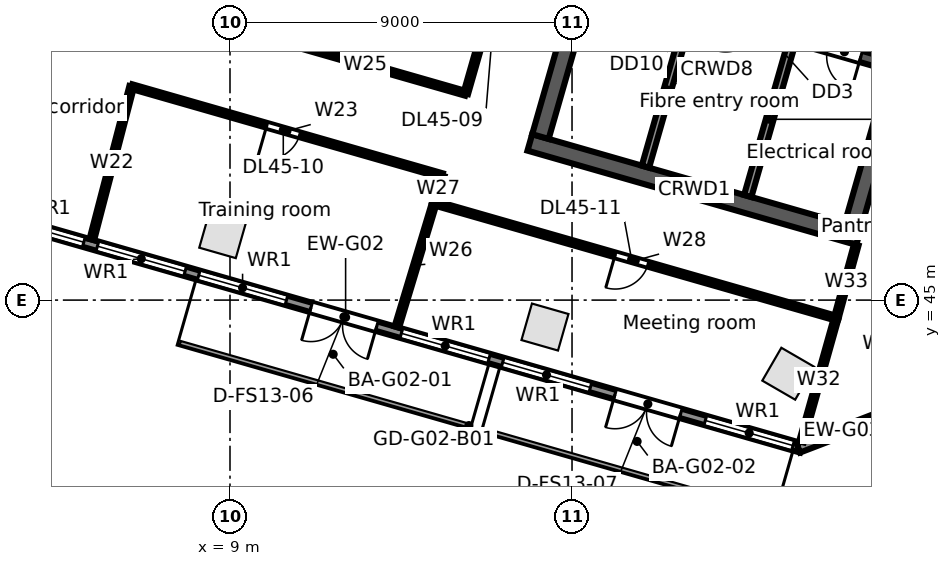
"""IFC4 building model, lengths in metres.
Left out: names, types, materials, properties, quantities, classifications, styles, units other than length and angle.
Written with IfcOpenShell. Run it as: python <this file> out.ifc"""

import sys

from ifc_helpers import new_model, si_unit, direction, frame, frame_2d, origin, origin_2d, place, context, subcontext, project, spatial, rectangle, extrude, element, fill, save


model = new_model("IFC4")
c1 = context("Model", 3, precision=1e-05, world=origin(), true_north=direction((0.0, 1.0)))
c2 = subcontext(c1, "Body", "Model", "MODEL_VIEW")
j1 = project(units=[si_unit("LENGTHUNIT", "METRE"), si_unit("PLANEANGLEUNIT", "RADIAN")], contexts=[c1])
p1 = place(None, origin())
s1 = spatial("IfcSite", under=j1, at=p1, CompositionType="ELEMENT")
p2 = place(p1, origin())
s2 = spatial("IfcBuilding", under=s1, at=p2, CompositionType="ELEMENT")
p3 = place(p2, frame((0.0, 0.0, 207.5)))
s3 = spatial("IfcBuildingStorey", under=s2, at=p3, CompositionType="ELEMENT", Elevation=207.5)
for number, where, z_axis, x_axis in (
    (1, (8.81, 46.722, 0.0), (0.0, 0.0, 1.0), (0.961, -0.276, 0.0)),
    (2, (17.288, 44.291, 0.0), (0.0, 0.0, 1.0), (0.961, -0.276, 0.0)),
    (3, (23.69, 43.063, 0.0), (0.0, 0.0, 1.0), (-0.865, 0.501, 0.0)),
):
    element("IfcColumn", number, at=place(p3, frame(where, z_axis=z_axis, x_axis=x_axis)), inside=s3, PredefinedType="COLUMN", context=c2, shape_type="SweptSolid", body=[
        extrude(rectangle(XDim=1.0, YDim=1.0, at=origin_2d()), origin(), (0.0, 0.0, 1.0), 3.9),
    ])
p4 = place(p3, frame((24.034, 41.108, 0.0), z_axis=(0.0, 0.0, 1.0), x_axis=(-0.96126060691, 0.275641153683, 0.0)))
e4 = element("IfcWall", 4, at=p4, inside=s3, PredefinedType="STANDARD", context=c2, shape_type="SweptSolid", body=[
    extrude(rectangle(XDim=24.951, YDim=0.25, at=frame_2d((12.475, 0.0))), origin(), (0.0, 0.0, 1.0), 3.62),
])
p5 = place(p4, frame((22.416, 0.0, 0.8)))
e5 = element("IfcOpeningElement", 5, at=p5, cuts=e4, PredefinedType="OPENING", context=c2, shape_type="SweptSolid", body=[
    extrude(rectangle(XDim=2.4, YDim=2.2, at=frame_2d((1.2, 1.1))), frame((0.0, 0.135, 0.0), z_axis=(0.0, -1.0, 0.0), x_axis=(1.0, 0.0, 0.0)), (0.0, 0.0, 1.0), 0.27),
])
p6 = place(p4, frame((19.643, 0.0, 0.8)))
e6 = element("IfcOpeningElement", 6, at=p6, cuts=e4, PredefinedType="OPENING", context=c2, shape_type="SweptSolid", body=[
    extrude(rectangle(XDim=2.4, YDim=2.2, at=frame_2d((1.2, 1.1))), frame((0.0, 0.135, 0.0), z_axis=(0.0, -1.0, 0.0), x_axis=(1.0, 0.0, 0.0)), (0.0, 0.0, 1.0), 0.27),
])
p7 = place(p4, frame((16.869, 0.0, 0.8)))
e7 = element("IfcOpeningElement", 7, at=p7, cuts=e4, PredefinedType="OPENING", context=c2, shape_type="SweptSolid", body=[
    extrude(rectangle(XDim=2.4, YDim=2.2, at=frame_2d((1.2, 1.1))), frame((0.0, 0.135, 0.0), z_axis=(0.0, -1.0, 0.0), x_axis=(1.0, 0.0, 0.0)), (0.0, 0.0, 1.0), 0.27),
])
p8 = place(p4, frame((14.096, 0.0, 0.8)))
e8 = element("IfcOpeningElement", 8, at=p8, cuts=e4, PredefinedType="OPENING", context=c2, shape_type="SweptSolid", body=[
    extrude(rectangle(XDim=2.4, YDim=2.2, at=frame_2d((1.2, 1.1))), frame((0.0, 0.135, 0.0), z_axis=(0.0, -1.0, 0.0), x_axis=(1.0, 0.0, 0.0)), (0.0, 0.0, 1.0), 0.27),
])
p9 = place(p4, frame((11.622, 0.0, 0.0)))
e9 = element("IfcOpeningElement", 9, at=p9, cuts=e4, PredefinedType="OPENING", context=c2, shape_type="SweptSolid", body=[
    extrude(rectangle(XDim=1.8, YDim=2.4, at=frame_2d((0.9, 1.2))), frame((0.0, 0.135, 0.0), z_axis=(0.0, -1.0, 0.0), x_axis=(1.0, 0.0, 0.0)), (0.0, 0.0, 1.0), 0.27),
])
p10 = place(p4, frame((8.549, 0.0, 0.8)))
e10 = element("IfcOpeningElement", 10, at=p10, cuts=e4, PredefinedType="OPENING", context=c2, shape_type="SweptSolid", body=[
    extrude(rectangle(XDim=2.4, YDim=2.2, at=frame_2d((1.2, 1.1))), frame((0.0, 0.135, 0.0), z_axis=(0.0, -1.0, 0.0), x_axis=(1.0, 0.0, 0.0)), (0.0, 0.0, 1.0), 0.27),
])
p11 = place(p4, frame((5.775, 0.0, 0.8)))
e11 = element("IfcOpeningElement", 11, at=p11, cuts=e4, PredefinedType="OPENING", context=c2, shape_type="SweptSolid", body=[
    extrude(rectangle(XDim=2.4, YDim=2.2, at=frame_2d((1.2, 1.1))), frame((0.0, 0.135, 0.0), z_axis=(0.0, -1.0, 0.0), x_axis=(1.0, 0.0, 0.0)), (0.0, 0.0, 1.0), 0.27),
])
p12 = place(p4, frame((3.302, 0.0, 0.0)))
e12 = element("IfcOpeningElement", 12, at=p12, cuts=e4, PredefinedType="OPENING", context=c2, shape_type="SweptSolid", body=[
    extrude(rectangle(XDim=1.8, YDim=2.4, at=frame_2d((0.9, 1.2))), frame((0.0, 0.135, 0.0), z_axis=(0.0, -1.0, 0.0), x_axis=(1.0, 0.0, 0.0)), (0.0, 0.0, 1.0), 0.27),
])
p13 = place(p4, frame((0.229, 0.0, 0.8)))
e13 = element("IfcOpeningElement", 13, at=p13, cuts=e4, PredefinedType="OPENING", context=c2, shape_type="SweptSolid", body=[
    extrude(rectangle(XDim=2.4, YDim=2.2, at=frame_2d((1.2, 1.1))), frame((0.0, 0.135, 0.0), z_axis=(0.0, -1.0, 0.0), x_axis=(1.0, 0.0, 0.0)), (0.0, 0.0, 1.0), 0.27),
])
p14 = place(p3, frame((26.27, 41.993, 0.0), z_axis=(0.0, 0.0, 1.0), x_axis=(-0.933573798066, -0.358385216722, 0.0)))
e14 = element("IfcWall", 14, at=p14, inside=s3, PredefinedType="STANDARD", context=c2, shape_type="SweptSolid", body=[
    extrude(rectangle(XDim=2.48, YDim=0.25, at=frame_2d((1.24, 0.0))), origin(), (0.0, 0.0, 1.0), 3.62),
])
p15 = place(p3, frame((16.89, 49.149, 0.0), z_axis=(0.0, 0.0, 1.0), x_axis=(0.96126248289, -0.275634611374, 0.0)))
e15 = element("IfcWall", 15, at=p15, inside=s3, PredefinedType="SOLIDWALL", context=c2, shape_type="SweptSolid", body=[
    extrude(rectangle(XDim=9.0, YDim=0.45, at=frame_2d((4.5, 0.0))), origin(), (0.0, 0.0, 1.0), 3.62),
])
p16 = place(p3, frame((21.131, 52.692, 0.0), z_axis=(0.0, 0.0, 1.0), x_axis=(0.961261488075, -0.275638080722, 0.0)))
e16 = element("IfcWall", 16, at=p16, inside=s3, PredefinedType="SOLIDWALL", context=c2, shape_type="SweptSolid", body=[
    extrude(rectangle(XDim=5.45, YDim=0.3, at=frame_2d((2.725, 0.0))), origin(), (0.0, 0.0, 1.0), 3.62),
])
p17 = place(p16, frame((0.95, 0.0, 0.0)))
e17 = element("IfcOpeningElement", 17, at=p17, cuts=e16, PredefinedType="OPENING", context=c2, shape_type="SweptSolid", body=[
    extrude(rectangle(XDim=0.9, YDim=2.1, at=frame_2d((0.45, 1.05))), frame((0.0, 0.16, 0.0), z_axis=(0.0, -1.0, 0.0), x_axis=(1.0, 0.0, 0.0)), (0.0, 0.0, 1.0), 0.32),
])
p18 = place(p16, frame((3.75, 0.0, 0.0)))
e18 = element("IfcOpeningElement", 18, at=p18, cuts=e16, PredefinedType="OPENING", context=c2, shape_type="SweptSolid", body=[
    extrude(rectangle(XDim=0.9, YDim=2.1, at=frame_2d((0.45, 1.05))), frame((0.0, 0.16, 0.0), z_axis=(0.0, -1.0, 0.0), x_axis=(1.0, 0.0, 0.0)), (0.0, 0.0, 1.0), 0.32),
])
p19 = place(p3, frame((17.168, 49.303, 0.0), z_axis=(0.0, 0.0, 1.0), x_axis=(0.275638974822, 0.961261231695, 0.0)))
e19 = element("IfcWall", 19, at=p19, inside=s3, PredefinedType="SOLIDWALL", context=c2, shape_type="SweptSolid", body=[
    extrude(rectangle(XDim=11.1, YDim=0.45, at=frame_2d((5.55, 0.0))), origin(), (0.0, 0.0, 1.0), 3.62),
])
p20 = place(p19, frame((4.95, 0.0, 0.0)))
e20 = element("IfcOpeningElement", 20, at=p20, cuts=e19, PredefinedType="OPENING", context=c2, shape_type="SweptSolid", body=[
    extrude(rectangle(XDim=1.2, YDim=2.1, at=frame_2d((0.6, 1.05))), frame((0.0, 0.235, 0.0), z_axis=(0.0, -1.0, 0.0), x_axis=(1.0, 0.0, 0.0)), (0.0, 0.0, 1.0), 0.47),
])
p21 = place(p3, frame((19.932, 48.511, 0.0), z_axis=(0.0, 0.0, 1.0), x_axis=(0.275642273411, 0.961260285827, 0.0)))
e21 = element("IfcWall", 21, at=p21, inside=s3, PredefinedType="SOLIDWALL", context=c2, shape_type="SweptSolid", body=[
    extrude(rectangle(XDim=4.2, YDim=0.2, at=frame_2d((2.1, 0.0))), origin(), (0.0, 0.0, 1.0), 3.62),
])
p22 = place(p3, frame((22.623, 47.739, 0.0), z_axis=(0.0, 0.0, 1.0), x_axis=(0.275642273411, 0.961260285827, 0.0)))
e22 = element("IfcWall", 22, at=p22, inside=s3, PredefinedType="PARTITIONING", context=c2, shape_type="SweptSolid", body=[
    extrude(rectangle(XDim=4.2, YDim=0.2, at=frame_2d((2.1, 0.0))), origin(), (0.0, 0.0, 1.0), 3.62),
])
p23 = place(p3, frame((25.387, 46.947, 0.0), z_axis=(0.0, 0.0, 1.0), x_axis=(0.275638974822, 0.961261231695, 0.0)))
e23 = element("IfcWall", 23, at=p23, inside=s3, PredefinedType="SOLIDWALL", context=c2, shape_type="SweptSolid", body=[
    extrude(rectangle(XDim=11.1, YDim=0.45, at=frame_2d((5.55, 0.0))), origin(), (0.0, 0.0, 1.0), 3.62),
])
p24 = place(p23, frame((4.95, 0.0, 0.0)))
e24 = element("IfcOpeningElement", 24, at=p24, cuts=e23, PredefinedType="OPENING", context=c2, shape_type="SweptSolid", body=[
    extrude(rectangle(XDim=1.2, YDim=2.1, at=frame_2d((0.6, 1.05))), frame((0.0, 0.235, 0.0), z_axis=(0.0, -1.0, 0.0), x_axis=(1.0, 0.0, 0.0)), (0.0, 0.0, 1.0), 0.47),
])
p25 = place(p3, frame((5.364, 46.592, 0.0), z_axis=(0.0, 0.0, 1.0), x_axis=(0.25210423577, 0.967700084895, 0.0)))
e25 = element("IfcWall", 25, at=p25, inside=s3, PredefinedType="PARTITIONING", context=c2, shape_type="SweptSolid", body=[
    extrude(rectangle(XDim=4.161, YDim=0.125, at=frame_2d((2.081, 0.0))), origin(), (0.0, 0.0, 1.0), 2.988),
])
p26 = place(p3, frame((6.413, 50.619, 0.0), z_axis=(0.0, 0.0, 1.0), x_axis=(0.961251402136, -0.275673252041, 0.0)))
e26 = element("IfcWall", 26, at=p26, inside=s3, PredefinedType="PARTITIONING", context=c2, shape_type="SweptSolid", body=[
    extrude(rectangle(XDim=8.499, YDim=0.125, at=frame_2d((4.25, 0.0))), origin(), (0.0, 0.0, 1.0), 2.8),
])
p27 = place(p26, frame((3.7, 0.0, 0.0)))
e27 = element("IfcOpeningElement", 27, at=p27, cuts=e26, PredefinedType="OPENING", context=c2, shape_type="SweptSolid", body=[
    extrude(rectangle(XDim=0.9, YDim=2.1, at=frame_2d((0.45, 1.05))), frame((0.0, 0.073, 0.0), z_axis=(0.0, -1.0, 0.0), x_axis=(1.0, 0.0, 0.0)), (0.0, 0.0, 1.0), 0.145),
])
p28 = place(p3, frame((9.917, 51.955, 0.0), z_axis=(0.0, 0.0, 1.0), x_axis=(0.961258850611, -0.275647278458, 0.0)))
e28 = element("IfcWall", 28, at=p28, inside=s3, PredefinedType="PARTITIONING", context=c2, shape_type="SweptSolid", body=[
    extrude(rectangle(XDim=5.5, YDim=0.125, at=frame_2d((2.75, 0.0))), origin(), (0.0, 0.0, 1.0), 2.8),
])
p29 = place(p3, frame((13.39, 44.29, 0.0), z_axis=(0.0, 0.0, 1.0), x_axis=(0.289389501276, 0.957211427299, 0.0)))
e29 = element("IfcWall", 29, at=p29, inside=s3, PredefinedType="PARTITIONING", context=c2, shape_type="SweptSolid", body=[
    extrude(rectangle(XDim=3.411, YDim=0.125, at=frame_2d((1.706, 0.0))), origin(), (0.0, 0.0, 1.0), 2.994),
])
p30 = place(p3, frame((14.377, 47.555, 0.0), z_axis=(0.0, 0.0, 1.0), x_axis=(0.274807134575, 0.961499370144, 0.0)))
e30 = element("IfcWall", 30, at=p30, inside=s3, PredefinedType="PARTITIONING", context=c2, shape_type="SweptSolid", body=[
    extrude(rectangle(XDim=0.75, YDim=0.125, at=frame_2d((0.375, 0.0))), origin(), (0.0, 0.0, 1.0), 3.62),
])
p31 = place(p3, frame((14.377, 47.555, 0.0), z_axis=(0.0, 0.0, 1.0), x_axis=(0.961263044958, -0.275632651182, 0.0)))
e31 = element("IfcWall", 31, at=p31, inside=s3, PredefinedType="PARTITIONING", context=c2, shape_type="SweptSolid", body=[
    extrude(rectangle(XDim=11.0, YDim=0.125, at=frame_2d((5.5, 0.0))), origin(), (0.0, 0.0, 1.0), 2.9),
])
p32 = place(p31, frame((4.95, 0.0, 0.0)))
e32 = element("IfcOpeningElement", 32, at=p32, cuts=e31, PredefinedType="OPENING", context=c2, shape_type="SweptSolid", body=[
    extrude(rectangle(XDim=0.9, YDim=2.1, at=frame_2d((0.45, 1.05))), frame((0.0, 0.073, 0.0), z_axis=(0.0, -1.0, 0.0), x_axis=(1.0, 0.0, 0.0)), (0.0, 0.0, 1.0), 0.145),
])
p33 = place(p3, frame((15.204, 50.439, 0.0), z_axis=(0.0, 0.0, 1.0), x_axis=(0.275505760599, 0.961299420512, 0.0)))
e33 = element("IfcWall", 33, at=p33, inside=s3, PredefinedType="PARTITIONING", context=c2, shape_type="SweptSolid", body=[
    extrude(rectangle(XDim=5.999, YDim=0.125, at=frame_2d((3.0, 0.0))), origin(), (0.0, 0.0, 1.0), 2.8),
])
p34 = place(p33, frame((2.45, 0.0, 0.0)))
e34 = element("IfcOpeningElement", 34, at=p34, cuts=e33, PredefinedType="OPENING", context=c2, shape_type="SweptSolid", body=[
    extrude(rectangle(XDim=0.9, YDim=2.1, at=frame_2d((0.45, 1.05))), frame((0.0, 0.073, 0.0), z_axis=(0.0, -1.0, 0.0), x_axis=(1.0, 0.0, 0.0)), (0.0, 0.0, 1.0), 0.145),
])
p35 = place(p3, frame((24.036, 41.27, 0.0), z_axis=(0.0, 0.0, 1.0), x_axis=(0.270787421954, 0.962639170256, 0.0)))
e35 = element("IfcWall", 35, at=p35, inside=s3, PredefinedType="PARTITIONING", context=c2, shape_type="SweptSolid", body=[
    extrude(rectangle(XDim=3.379, YDim=0.125, at=frame_2d((1.689, 0.0))), origin(), (0.0, 0.0, 1.0), 2.9),
])
p36 = place(p3, frame((24.951, 44.523, 0.0), z_axis=(0.0, 0.0, 1.0), x_axis=(0.264046927145, 0.964509834198, 0.0)))
e36 = element("IfcWall", 36, at=p36, inside=s3, PredefinedType="PARTITIONING", context=c2, shape_type="SweptSolid", body=[
    extrude(rectangle(XDim=2.0, YDim=0.125, at=frame_2d((1.0, 0.0))), origin(), (0.0, 0.0, 1.0), 2.9),
])
p37 = place(p6, origin())
e37 = element("IfcWindow", 37, at=p37, inside=s3, PartitioningType="SINGLE_PANEL", PredefinedType="WINDOW", context=c2, shape_type="SweptSolid", body=[
    extrude(rectangle(XDim=2.4, YDim=2.2, at=frame_2d((1.2, 1.1))), frame((0.0, 0.03, 0.0), z_axis=(0.0, -1.0, 0.0), x_axis=(1.0, 0.0, 0.0)), (0.0, 0.0, 1.0), 0.06),
])
fill(e6, e37)
p38 = place(p7, origin())
e38 = element("IfcWindow", 38, at=p38, inside=s3, PartitioningType="SINGLE_PANEL", PredefinedType="WINDOW", context=c2, shape_type="SweptSolid", body=[
    extrude(rectangle(XDim=2.4, YDim=2.2, at=frame_2d((1.2, 1.1))), frame((0.0, 0.03, 0.0), z_axis=(0.0, -1.0, 0.0), x_axis=(1.0, 0.0, 0.0)), (0.0, 0.0, 1.0), 0.06),
])
fill(e7, e38)
p39 = place(p8, origin())
e39 = element("IfcWindow", 39, at=p39, inside=s3, PartitioningType="SINGLE_PANEL", PredefinedType="WINDOW", context=c2, shape_type="SweptSolid", body=[
    extrude(rectangle(XDim=2.4, YDim=2.2, at=frame_2d((1.2, 1.1))), frame((0.0, 0.03, 0.0), z_axis=(0.0, -1.0, 0.0), x_axis=(1.0, 0.0, 0.0)), (0.0, 0.0, 1.0), 0.06),
])
fill(e8, e39)
p40 = place(p9, origin())
e40 = element("IfcDoor", 40, at=p40, inside=s3, OperationType="DOUBLE_DOOR_SINGLE_SWING", PredefinedType="DOOR", context=c2, shape_type="SweptSolid", body=[
    extrude(rectangle(XDim=1.8, YDim=2.4, at=frame_2d((0.9, 1.2))), frame((0.0, 0.025, 0.0), z_axis=(0.0, -1.0, 0.0), x_axis=(1.0, 0.0, 0.0)), (0.0, 0.0, 1.0), 0.05),
])
fill(e9, e40)
p41 = place(p10, origin())
e41 = element("IfcWindow", 41, at=p41, inside=s3, PartitioningType="SINGLE_PANEL", PredefinedType="WINDOW", context=c2, shape_type="SweptSolid", body=[
    extrude(rectangle(XDim=2.4, YDim=2.2, at=frame_2d((1.2, 1.1))), frame((0.0, 0.03, 0.0), z_axis=(0.0, -1.0, 0.0), x_axis=(1.0, 0.0, 0.0)), (0.0, 0.0, 1.0), 0.06),
])
fill(e10, e41)
p42 = place(p11, origin())
e42 = element("IfcWindow", 42, at=p42, inside=s3, PartitioningType="SINGLE_PANEL", PredefinedType="WINDOW", context=c2, shape_type="SweptSolid", body=[
    extrude(rectangle(XDim=2.4, YDim=2.2, at=frame_2d((1.2, 1.1))), frame((0.0, 0.03, 0.0), z_axis=(0.0, -1.0, 0.0), x_axis=(1.0, 0.0, 0.0)), (0.0, 0.0, 1.0), 0.06),
])
fill(e11, e42)
p43 = place(p12, origin())
e43 = element("IfcDoor", 43, at=p43, inside=s3, OperationType="DOUBLE_DOOR_SINGLE_SWING", PredefinedType="DOOR", context=c2, shape_type="SweptSolid", body=[
    extrude(rectangle(XDim=1.8, YDim=2.4, at=frame_2d((0.9, 1.2))), frame((0.0, 0.025, 0.0), z_axis=(0.0, -1.0, 0.0), x_axis=(1.0, 0.0, 0.0)), (0.0, 0.0, 1.0), 0.05),
])
fill(e12, e43)
p44 = place(p13, origin())
e44 = element("IfcWindow", 44, at=p44, inside=s3, PartitioningType="SINGLE_PANEL", PredefinedType="WINDOW", context=c2, shape_type="SweptSolid", body=[
    extrude(rectangle(XDim=2.4, YDim=2.2, at=frame_2d((1.2, 1.1))), frame((0.0, 0.03, 0.0), z_axis=(0.0, -1.0, 0.0), x_axis=(1.0, 0.0, 0.0)), (0.0, 0.0, 1.0), 0.06),
])
fill(e13, e44)
p45 = place(p18, frame((0.9, 0.0, 0.0), z_axis=(0.0, 0.0, 1.0), x_axis=(-1.0, 0.0, 0.0)))
e45 = element("IfcDoor", 45, at=p45, inside=s3, OperationType="SINGLE_SWING_LEFT", PredefinedType="DOOR", context=c2, shape_type="SweptSolid", body=[
    extrude(rectangle(XDim=0.9, YDim=2.1, at=frame_2d((0.45, 1.05))), frame((0.0, 0.025, 0.0), z_axis=(0.0, -1.0, 0.0), x_axis=(1.0, 0.0, 0.0)), (0.0, 0.0, 1.0), 0.05),
])
fill(e18, e45)
p46 = place(p27, frame((0.9, 0.0, 0.0), z_axis=(0.0, 0.0, 1.0), x_axis=(-1.0, 0.0, 0.0)))
e46 = element("IfcDoor", 46, at=p46, inside=s3, OperationType="SINGLE_SWING_RIGHT", PredefinedType="DOOR", context=c2, shape_type="SweptSolid", body=[
    extrude(rectangle(XDim=0.9, YDim=2.1, at=frame_2d((0.45, 1.05))), frame((0.0, 0.025, 0.0), z_axis=(0.0, -1.0, 0.0), x_axis=(1.0, 0.0, 0.0)), (0.0, 0.0, 1.0), 0.05),
])
fill(e27, e46)
p47 = place(p32, frame((0.9, 0.0, 0.0), z_axis=(0.0, 0.0, 1.0), x_axis=(-1.0, 0.0, 0.0)))
e47 = element("IfcDoor", 47, at=p47, inside=s3, OperationType="SINGLE_SWING_RIGHT", PredefinedType="DOOR", context=c2, shape_type="SweptSolid", body=[
    extrude(rectangle(XDim=0.9, YDim=2.1, at=frame_2d((0.45, 1.05))), frame((0.0, 0.025, 0.0), z_axis=(0.0, -1.0, 0.0), x_axis=(1.0, 0.0, 0.0)), (0.0, 0.0, 1.0), 0.05),
])
fill(e32, e47)
save(model, sys.argv[1])
